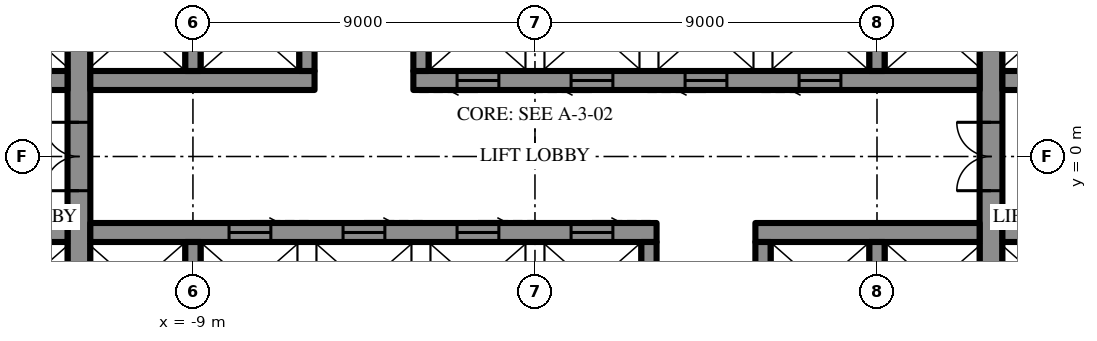
"""IFC4 building model, lengths in metres.
Left out: names, types, materials, properties, quantities, classifications, styles, units other than length and angle.
Written with IfcOpenShell. Run it as: python <this file> out.ifc"""

import sys

from ifc_helpers import new_model, si_unit, direction, frame, frame_2d, origin, place, context, subcontext, project, spatial, rectangle, extrude, element, fill, save


model = new_model("IFC4")
c1 = context("Model", 3, precision=1e-05, world=origin(), true_north=direction((0.0, 1.0)))
c2 = subcontext(c1, "Body", "Model", "MODEL_VIEW")
j1 = project(units=[si_unit("LENGTHUNIT", "METRE"), si_unit("PLANEANGLEUNIT", "RADIAN")], contexts=[c1])
p1 = place(None, origin())
s1 = spatial("IfcSite", under=j1, at=p1, CompositionType="ELEMENT")
p2 = place(p1, origin())
s2 = spatial("IfcBuilding", under=s1, at=p2, CompositionType="ELEMENT")
p3 = place(p2, frame((0.0, 0.0, 148.9)))
s3 = spatial("IfcBuildingStorey", under=s2, at=p3, CompositionType="ELEMENT", Elevation=148.9)
p4 = place(p3, frame((12.0, -10.7, 0.0), z_axis=(0.0, 0.0, 1.0), x_axis=(0.0, 1.0, 0.0)))
e1 = element("IfcWall", 1, at=p4, inside=s3, PredefinedType="SHEAR", context=c2, shape_type="SweptSolid", body=[
    extrude(rectangle(XDim=21.4, YDim=0.6, at=frame_2d((10.7, 0.0))), origin(), (0.0, 0.0, 1.0), 4.2),
])
p5 = place(p4, frame((9.8, 0.0, 0.0)))
e2 = element("IfcOpeningElement", 2, at=p5, cuts=e1, PredefinedType="OPENING", context=c2, shape_type="SweptSolid", body=[
    extrude(rectangle(XDim=1.8, YDim=2.4, at=frame_2d((0.9, 1.2))), frame((0.0, 0.31, 0.0), z_axis=(0.0, -1.0, 0.0), x_axis=(1.0, 0.0, 0.0)), (0.0, 0.0, 1.0), 0.62),
])
p6 = place(p3, frame((-12.0, -10.7, 0.0), z_axis=(0.0, 0.0, 1.0), x_axis=(0.0, 1.0, 0.0)))
e3 = element("IfcWall", 3, at=p6, inside=s3, PredefinedType="SHEAR", context=c2, shape_type="SweptSolid", body=[
    extrude(rectangle(XDim=21.4, YDim=0.6, at=frame_2d((10.7, 0.0))), origin(), (0.0, 0.0, 1.0), 4.2),
])
p7 = place(p6, frame((9.8, 0.0, 0.0)))
e4 = element("IfcOpeningElement", 4, at=p7, cuts=e3, PredefinedType="OPENING", context=c2, shape_type="SweptSolid", body=[
    extrude(rectangle(XDim=1.8, YDim=2.4, at=frame_2d((0.9, 1.2))), frame((0.0, 0.31, 0.0), z_axis=(0.0, -1.0, 0.0), x_axis=(1.0, 0.0, 0.0)), (0.0, 0.0, 1.0), 0.62),
])
p8 = place(p3, frame((-14.7, 2.0, 0.0), z_axis=(0.0, 0.0, 1.0), x_axis=(1.0, 0.0, 0.0)))
e5 = element("IfcWall", 5, at=p8, inside=s3, PredefinedType="SHEAR", context=c2, shape_type="SweptSolid", body=[
    extrude(rectangle(XDim=2.4, YDim=0.5, at=frame_2d((1.2, 0.0))), origin(), (0.0, 0.0, 1.0), 4.2),
])
p9 = place(p3, frame((-11.7, 2.0, 0.0), z_axis=(0.0, 0.0, 1.0), x_axis=(1.0, 0.0, 0.0)))
e6 = element("IfcWall", 6, at=p9, inside=s3, PredefinedType="SHEAR", context=c2, shape_type="SweptSolid", body=[
    extrude(rectangle(XDim=5.9, YDim=0.5, at=frame_2d((2.95, 0.0))), origin(), (0.0, 0.0, 1.0), 4.2),
])
p10 = place(p3, frame((-3.2, 2.0, 0.0), z_axis=(0.0, 0.0, 1.0), x_axis=(1.0, 0.0, 0.0)))
e7 = element("IfcWall", 7, at=p10, inside=s3, PredefinedType="SHEAR", context=c2, shape_type="SweptSolid", body=[
    extrude(rectangle(XDim=14.9, YDim=0.5, at=frame_2d((7.45, 0.0))), origin(), (0.0, 0.0, 1.0), 4.2),
])
p11 = place(p10, frame((1.15, 0.0, 0.0)))
e8 = element("IfcOpeningElement", 8, at=p11, cuts=e7, PredefinedType="OPENING", context=c2, shape_type="SweptSolid", body=[
    extrude(rectangle(XDim=1.1, YDim=2.2, at=frame_2d((0.55, 1.1))), frame((0.0, 0.26, 0.0), z_axis=(0.0, -1.0, 0.0), x_axis=(1.0, 0.0, 0.0)), (0.0, 0.0, 1.0), 0.52),
])
p12 = place(p10, frame((4.15, 0.0, 0.0)))
e9 = element("IfcOpeningElement", 9, at=p12, cuts=e7, PredefinedType="OPENING", context=c2, shape_type="SweptSolid", body=[
    extrude(rectangle(XDim=1.1, YDim=2.2, at=frame_2d((0.55, 1.1))), frame((0.0, 0.26, 0.0), z_axis=(0.0, -1.0, 0.0), x_axis=(1.0, 0.0, 0.0)), (0.0, 0.0, 1.0), 0.52),
])
p13 = place(p10, frame((7.15, 0.0, 0.0)))
e10 = element("IfcOpeningElement", 10, at=p13, cuts=e7, PredefinedType="OPENING", context=c2, shape_type="SweptSolid", body=[
    extrude(rectangle(XDim=1.1, YDim=2.2, at=frame_2d((0.55, 1.1))), frame((0.0, 0.26, 0.0), z_axis=(0.0, -1.0, 0.0), x_axis=(1.0, 0.0, 0.0)), (0.0, 0.0, 1.0), 0.52),
])
p14 = place(p10, frame((10.15, 0.0, 0.0)))
e11 = element("IfcOpeningElement", 11, at=p14, cuts=e7, PredefinedType="OPENING", context=c2, shape_type="SweptSolid", body=[
    extrude(rectangle(XDim=1.1, YDim=2.2, at=frame_2d((0.55, 1.1))), frame((0.0, 0.26, 0.0), z_axis=(0.0, -1.0, 0.0), x_axis=(1.0, 0.0, 0.0)), (0.0, 0.0, 1.0), 0.52),
])
p15 = place(p3, frame((12.3, 2.0, 0.0), z_axis=(0.0, 0.0, 1.0), x_axis=(1.0, 0.0, 0.0)))
e12 = element("IfcWall", 12, at=p15, inside=s3, PredefinedType="SHEAR", context=c2, shape_type="SweptSolid", body=[
    extrude(rectangle(XDim=2.4, YDim=0.5, at=frame_2d((1.2, 0.0))), origin(), (0.0, 0.0, 1.0), 4.2),
])
for number, where, z_axis, x_axis in (
    (13, (-9.0, 2.25, 0.0), (0.0, 0.0, 1.0), (0.0, 1.0, 0.0)),
    (14, (-6.0, 2.25, 0.0), (0.0, 0.0, 1.0), (0.0, 1.0, 0.0)),
    (15, (-3.0, 2.25, 0.0), (0.0, 0.0, 1.0), (0.0, 1.0, 0.0)),
    (16, (9.0, 2.25, 0.0), (0.0, 0.0, 1.0), (0.0, 1.0, 0.0)),
):
    element("IfcWall", number, at=place(p3, frame(where, z_axis=z_axis, x_axis=x_axis)), inside=s3, PredefinedType="SHEAR", context=c2, shape_type="SweptSolid", body=[
        extrude(rectangle(XDim=2.3, YDim=0.4, at=frame_2d((1.15, 0.0))), origin(), (0.0, 0.0, 1.0), 4.2),
    ])
p16 = place(p3, frame((14.7, -2.0, 0.0), z_axis=(0.0, 0.0, 1.0), x_axis=(-1.0, 0.0, 0.0)))
e17 = element("IfcWall", 17, at=p16, inside=s3, PredefinedType="SHEAR", context=c2, shape_type="SweptSolid", body=[
    extrude(rectangle(XDim=2.4, YDim=0.5, at=frame_2d((1.2, 0.0))), origin(), (0.0, 0.0, 1.0), 4.2),
])
p17 = place(p3, frame((11.7, -2.0, 0.0), z_axis=(0.0, 0.0, 1.0), x_axis=(-1.0, 0.0, 0.0)))
e18 = element("IfcWall", 18, at=p17, inside=s3, PredefinedType="SHEAR", context=c2, shape_type="SweptSolid", body=[
    extrude(rectangle(XDim=5.9, YDim=0.5, at=frame_2d((2.95, 0.0))), origin(), (0.0, 0.0, 1.0), 4.2),
])
p18 = place(p3, frame((3.2, -2.0, 0.0), z_axis=(0.0, 0.0, 1.0), x_axis=(-1.0, 0.0, 0.0)))
e19 = element("IfcWall", 19, at=p18, inside=s3, PredefinedType="SHEAR", context=c2, shape_type="SweptSolid", body=[
    extrude(rectangle(XDim=14.9, YDim=0.5, at=frame_2d((7.45, 0.0))), origin(), (0.0, 0.0, 1.0), 4.2),
])
p19 = place(p18, frame((1.15, 0.0, 0.0)))
e20 = element("IfcOpeningElement", 20, at=p19, cuts=e19, PredefinedType="OPENING", context=c2, shape_type="SweptSolid", body=[
    extrude(rectangle(XDim=1.1, YDim=2.2, at=frame_2d((0.55, 1.1))), frame((0.0, 0.26, 0.0), z_axis=(0.0, -1.0, 0.0), x_axis=(1.0, 0.0, 0.0)), (0.0, 0.0, 1.0), 0.52),
])
p20 = place(p18, frame((4.15, 0.0, 0.0)))
e21 = element("IfcOpeningElement", 21, at=p20, cuts=e19, PredefinedType="OPENING", context=c2, shape_type="SweptSolid", body=[
    extrude(rectangle(XDim=1.1, YDim=2.2, at=frame_2d((0.55, 1.1))), frame((0.0, 0.26, 0.0), z_axis=(0.0, -1.0, 0.0), x_axis=(1.0, 0.0, 0.0)), (0.0, 0.0, 1.0), 0.52),
])
p21 = place(p18, frame((7.15, 0.0, 0.0)))
e22 = element("IfcOpeningElement", 22, at=p21, cuts=e19, PredefinedType="OPENING", context=c2, shape_type="SweptSolid", body=[
    extrude(rectangle(XDim=1.1, YDim=2.2, at=frame_2d((0.55, 1.1))), frame((0.0, 0.26, 0.0), z_axis=(0.0, -1.0, 0.0), x_axis=(1.0, 0.0, 0.0)), (0.0, 0.0, 1.0), 0.52),
])
p22 = place(p18, frame((10.15, 0.0, 0.0)))
e23 = element("IfcOpeningElement", 23, at=p22, cuts=e19, PredefinedType="OPENING", context=c2, shape_type="SweptSolid", body=[
    extrude(rectangle(XDim=1.1, YDim=2.2, at=frame_2d((0.55, 1.1))), frame((0.0, 0.26, 0.0), z_axis=(0.0, -1.0, 0.0), x_axis=(1.0, 0.0, 0.0)), (0.0, 0.0, 1.0), 0.52),
])
p23 = place(p3, frame((-12.3, -2.0, 0.0), z_axis=(0.0, 0.0, 1.0), x_axis=(-1.0, 0.0, 0.0)))
e24 = element("IfcWall", 24, at=p23, inside=s3, PredefinedType="SHEAR", context=c2, shape_type="SweptSolid", body=[
    extrude(rectangle(XDim=2.4, YDim=0.5, at=frame_2d((1.2, 0.0))), origin(), (0.0, 0.0, 1.0), 4.2),
])
for number, where, z_axis, x_axis in (
    (25, (9.0, -2.25, 0.0), (0.0, 0.0, 1.0), (0.0, -1.0, 0.0)),
    (26, (6.0, -2.25, 0.0), (0.0, 0.0, 1.0), (0.0, -1.0, 0.0)),
    (27, (3.0, -2.25, 0.0), (0.0, 0.0, 1.0), (0.0, -1.0, 0.0)),
    (28, (-9.0, -2.25, 0.0), (0.0, 0.0, 1.0), (0.0, -1.0, 0.0)),
):
    element("IfcWall", number, at=place(p3, frame(where, z_axis=z_axis, x_axis=x_axis)), inside=s3, PredefinedType="SHEAR", context=c2, shape_type="SweptSolid", body=[
        extrude(rectangle(XDim=2.3, YDim=0.4, at=frame_2d((1.15, 0.0))), origin(), (0.0, 0.0, 1.0), 4.2),
    ])
p24 = place(p5, origin())
e29 = element("IfcDoor", 29, at=p24, inside=s3, OperationType="DOUBLE_DOOR_SINGLE_SWING", PredefinedType="DOOR", context=c2, shape_type="SweptSolid", body=[
    extrude(rectangle(XDim=1.8, YDim=2.4, at=frame_2d((0.9, 1.2))), frame((0.0, 0.025, 0.0), z_axis=(0.0, -1.0, 0.0), x_axis=(1.0, 0.0, 0.0)), (0.0, 0.0, 1.0), 0.05),
])
fill(e2, e29)
p25 = place(p7, origin())
e30 = element("IfcDoor", 30, at=p25, inside=s3, OperationType="DOUBLE_DOOR_SINGLE_SWING", PredefinedType="DOOR", context=c2, shape_type="SweptSolid", body=[
    extrude(rectangle(XDim=1.8, YDim=2.4, at=frame_2d((0.9, 1.2))), frame((0.0, 0.025, 0.0), z_axis=(0.0, -1.0, 0.0), x_axis=(1.0, 0.0, 0.0)), (0.0, 0.0, 1.0), 0.05),
])
fill(e4, e30)
p26 = place(p11, frame((1.1, 0.0, 0.0), z_axis=(0.0, 0.0, 1.0), x_axis=(-1.0, 0.0, 0.0)))
e31 = element("IfcDoor", 31, at=p26, inside=s3, OperationType="SLIDING_TO_LEFT", PredefinedType="DOOR", context=c2, shape_type="SweptSolid", body=[
    extrude(rectangle(XDim=1.1, YDim=2.2, at=frame_2d((0.55, 1.1))), frame((0.0, 0.025, 0.0), z_axis=(0.0, -1.0, 0.0), x_axis=(1.0, 0.0, 0.0)), (0.0, 0.0, 1.0), 0.05),
])
fill(e8, e31)
p27 = place(p12, frame((1.1, 0.0, 0.0), z_axis=(0.0, 0.0, 1.0), x_axis=(-1.0, 0.0, 0.0)))
e32 = element("IfcDoor", 32, at=p27, inside=s3, OperationType="SLIDING_TO_LEFT", PredefinedType="DOOR", context=c2, shape_type="SweptSolid", body=[
    extrude(rectangle(XDim=1.1, YDim=2.2, at=frame_2d((0.55, 1.1))), frame((0.0, 0.025, 0.0), z_axis=(0.0, -1.0, 0.0), x_axis=(1.0, 0.0, 0.0)), (0.0, 0.0, 1.0), 0.05),
])
fill(e9, e32)
p28 = place(p13, frame((1.1, 0.0, 0.0), z_axis=(0.0, 0.0, 1.0), x_axis=(-1.0, 0.0, 0.0)))
e33 = element("IfcDoor", 33, at=p28, inside=s3, OperationType="SLIDING_TO_LEFT", PredefinedType="DOOR", context=c2, shape_type="SweptSolid", body=[
    extrude(rectangle(XDim=1.1, YDim=2.2, at=frame_2d((0.55, 1.1))), frame((0.0, 0.025, 0.0), z_axis=(0.0, -1.0, 0.0), x_axis=(1.0, 0.0, 0.0)), (0.0, 0.0, 1.0), 0.05),
])
fill(e10, e33)
p29 = place(p14, frame((1.1, 0.0, 0.0), z_axis=(0.0, 0.0, 1.0), x_axis=(-1.0, 0.0, 0.0)))
e34 = element("IfcDoor", 34, at=p29, inside=s3, OperationType="SLIDING_TO_LEFT", PredefinedType="DOOR", context=c2, shape_type="SweptSolid", body=[
    extrude(rectangle(XDim=1.1, YDim=2.2, at=frame_2d((0.55, 1.1))), frame((0.0, 0.025, 0.0), z_axis=(0.0, -1.0, 0.0), x_axis=(1.0, 0.0, 0.0)), (0.0, 0.0, 1.0), 0.05),
])
fill(e11, e34)
p30 = place(p19, frame((1.1, 0.0, 0.0), z_axis=(0.0, 0.0, 1.0), x_axis=(-1.0, 0.0, 0.0)))
e35 = element("IfcDoor", 35, at=p30, inside=s3, OperationType="SLIDING_TO_LEFT", PredefinedType="DOOR", context=c2, shape_type="SweptSolid", body=[
    extrude(rectangle(XDim=1.1, YDim=2.2, at=frame_2d((0.55, 1.1))), frame((0.0, 0.025, 0.0), z_axis=(0.0, -1.0, 0.0), x_axis=(1.0, 0.0, 0.0)), (0.0, 0.0, 1.0), 0.05),
])
fill(e20, e35)
p31 = place(p20, frame((1.1, 0.0, 0.0), z_axis=(0.0, 0.0, 1.0), x_axis=(-1.0, 0.0, 0.0)))
e36 = element("IfcDoor", 36, at=p31, inside=s3, OperationType="SLIDING_TO_LEFT", PredefinedType="DOOR", context=c2, shape_type="SweptSolid", body=[
    extrude(rectangle(XDim=1.1, YDim=2.2, at=frame_2d((0.55, 1.1))), frame((0.0, 0.025, 0.0), z_axis=(0.0, -1.0, 0.0), x_axis=(1.0, 0.0, 0.0)), (0.0, 0.0, 1.0), 0.05),
])
fill(e21, e36)
p32 = place(p21, frame((1.1, 0.0, 0.0), z_axis=(0.0, 0.0, 1.0), x_axis=(-1.0, 0.0, 0.0)))
e37 = element("IfcDoor", 37, at=p32, inside=s3, OperationType="SLIDING_TO_LEFT", PredefinedType="DOOR", context=c2, shape_type="SweptSolid", body=[
    extrude(rectangle(XDim=1.1, YDim=2.2, at=frame_2d((0.55, 1.1))), frame((0.0, 0.025, 0.0), z_axis=(0.0, -1.0, 0.0), x_axis=(1.0, 0.0, 0.0)), (0.0, 0.0, 1.0), 0.05),
])
fill(e22, e37)
p33 = place(p22, frame((1.1, 0.0, 0.0), z_axis=(0.0, 0.0, 1.0), x_axis=(-1.0, 0.0, 0.0)))
e38 = element("IfcDoor", 38, at=p33, inside=s3, OperationType="SLIDING_TO_LEFT", PredefinedType="DOOR", context=c2, shape_type="SweptSolid", body=[
    extrude(rectangle(XDim=1.1, YDim=2.2, at=frame_2d((0.55, 1.1))), frame((0.0, 0.025, 0.0), z_axis=(0.0, -1.0, 0.0), x_axis=(1.0, 0.0, 0.0)), (0.0, 0.0, 1.0), 0.05),
])
fill(e23, e38)
save(model, sys.argv[1])
